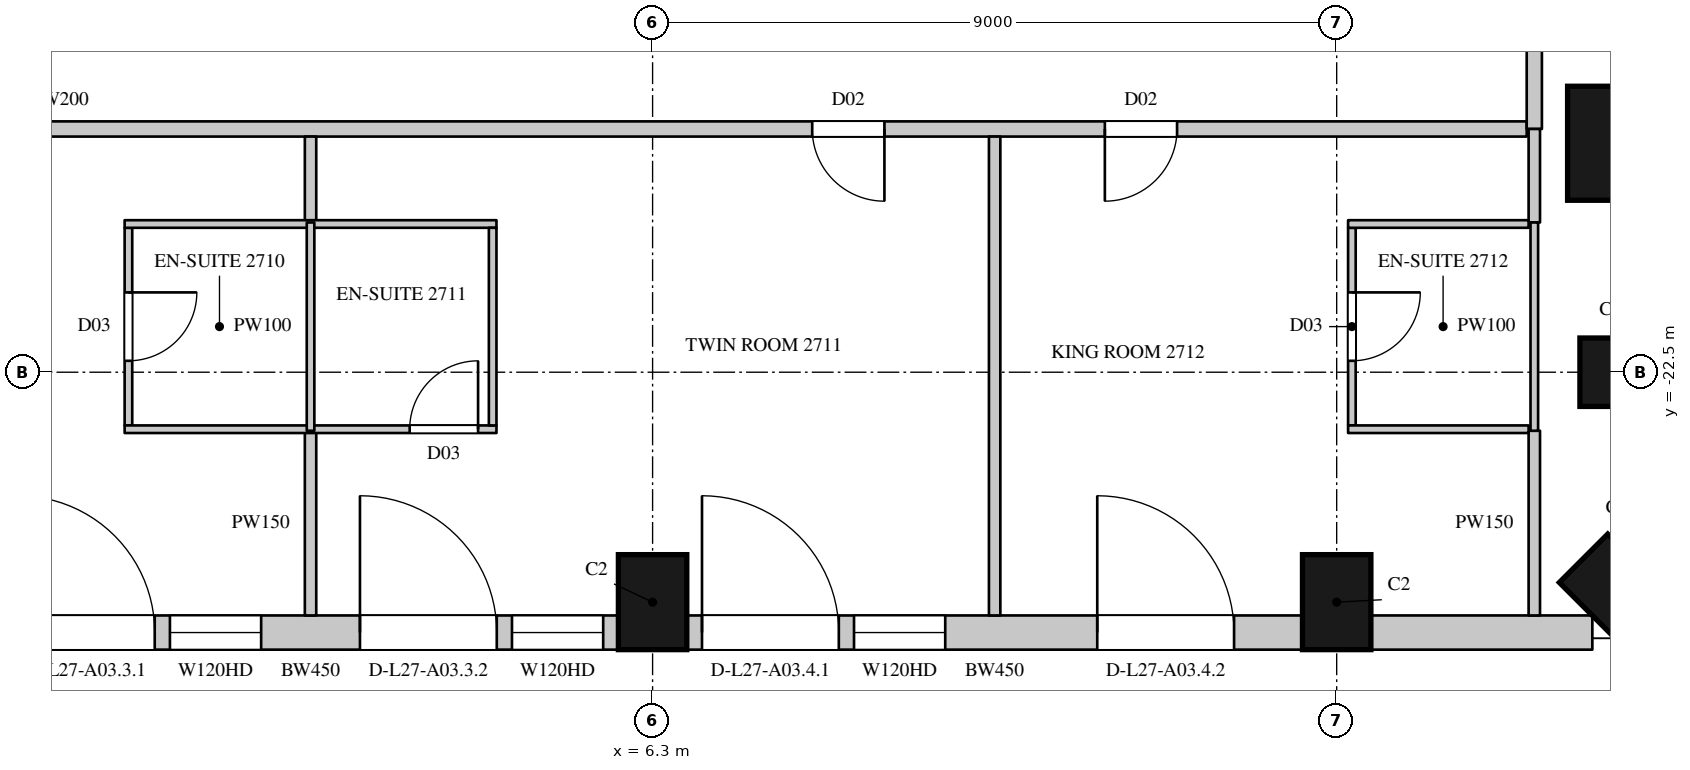
"""IFC4 building model, lengths in metres.
Left out: names, types, materials, properties, quantities, classifications, styles, units other than length and angle.
Written with IfcOpenShell. Run it as: python <this file> out.ifc"""

import sys

from ifc_helpers import new_model, si_unit, direction, frame, frame_2d, origin, origin_2d, place, context, subcontext, project, spatial, rectangle, circle, extrude, element, fill, save


model = new_model("IFC4")
c1 = context("Model", 3, precision=1e-05, world=origin(), true_north=direction((0.0, 1.0)))
c2 = subcontext(c1, "Body", "Model", "MODEL_VIEW")
j1 = project(units=[si_unit("LENGTHUNIT", "METRE"), si_unit("PLANEANGLEUNIT", "RADIAN")], contexts=[c1])
p1 = place(None, origin())
s1 = spatial("IfcSite", under=j1, at=p1, CompositionType="ELEMENT")
p2 = place(p1, origin())
s2 = spatial("IfcBuilding", under=s1, at=p2, CompositionType="ELEMENT")
p3 = place(p2, frame((0.0, 0.0, 127.5)))
s3 = spatial("IfcBuildingStorey", under=s2, at=p3, CompositionType="ELEMENT", Elevation=127.5)
for number, where, z_axis, x_axis in (
    (1, (6.3, -25.525, 0.0), (0.0, 0.0, 1.0), (1.0, 0.0, 0.0)),
    (2, (15.3, -25.525, 0.0), (0.0, 0.0, 1.0), (1.0, 0.0, 0.0)),
    (3, (18.99, -25.39, 0.0), (0.0, 0.0, 1.0), (0.707, 0.707, 0.0)),
    (4, (19.125, -22.5, 0.0), (0.0, 0.0, 1.0), (0.0, 1.0, 0.0)),
):
    element("IfcColumn", number, at=place(p3, frame(where, z_axis=z_axis, x_axis=x_axis)), inside=s3, PredefinedType="COLUMN", context=c2, shape_type="SweptSolid", body=[
        extrude(rectangle(XDim=0.9, YDim=1.25, at=origin_2d()), origin(), (0.0, 0.0, 1.0), 3.6),
    ])
p4 = place(p3, frame((19.088, -19.488, 0.0), z_axis=(0.0, 0.0, 1.0), x_axis=(1.0, 0.0, 0.0)))
e5 = element("IfcColumn", 5, at=p4, inside=s3, PredefinedType="COLUMN", context=c2, shape_type="SweptSolid", body=[
    extrude(circle(Radius=0.75, at=origin_2d()), origin(), (0.0, 0.0, 1.0), 3.6),
])
p5 = place(p3, frame((-2.25, -25.925, 0.0), z_axis=(0.0, 0.0, 1.0), x_axis=(1.0, 0.0, 0.0)))
e6 = element("IfcWall", 6, at=p5, inside=s3, PredefinedType="SOLIDWALL", context=c2, shape_type="SweptSolid", body=[
    extrude(rectangle(XDim=8.1, YDim=0.45, at=frame_2d((4.05, 0.0))), origin(), (0.0, 0.0, 1.0), 3.3),
])
p6 = place(p5, frame((0.2, 0.0, 0.0)))
e7 = element("IfcOpeningElement", 7, at=p6, cuts=e6, PredefinedType="OPENING", context=c2, shape_type="SweptSolid", body=[
    extrude(rectangle(XDim=1.8, YDim=2.4, at=frame_2d((0.9, 1.2))), frame((0.0, 0.235, 0.0), z_axis=(0.0, -1.0, 0.0), x_axis=(1.0, 0.0, 0.0)), (0.0, 0.0, 1.0), 0.47),
])
p7 = place(p5, frame((2.2, 0.0, 1.05)))
e8 = element("IfcOpeningElement", 8, at=p7, cuts=e6, PredefinedType="OPENING", context=c2, shape_type="SweptSolid", body=[
    extrude(rectangle(XDim=1.2, YDim=2.0, at=frame_2d((0.6, 1.0))), frame((0.0, 0.235, 0.0), z_axis=(0.0, -1.0, 0.0), x_axis=(1.0, 0.0, 0.0)), (0.0, 0.0, 1.0), 0.47),
])
p8 = place(p5, frame((4.7, 0.0, 0.0)))
e9 = element("IfcOpeningElement", 9, at=p8, cuts=e6, PredefinedType="OPENING", context=c2, shape_type="SweptSolid", body=[
    extrude(rectangle(XDim=1.8, YDim=2.4, at=frame_2d((0.9, 1.2))), frame((0.0, 0.235, 0.0), z_axis=(0.0, -1.0, 0.0), x_axis=(1.0, 0.0, 0.0)), (0.0, 0.0, 1.0), 0.47),
])
p9 = place(p5, frame((6.7, 0.0, 1.05)))
e10 = element("IfcOpeningElement", 10, at=p9, cuts=e6, PredefinedType="OPENING", context=c2, shape_type="SweptSolid", body=[
    extrude(rectangle(XDim=1.2, YDim=2.0, at=frame_2d((0.6, 1.0))), frame((0.0, 0.235, 0.0), z_axis=(0.0, -1.0, 0.0), x_axis=(1.0, 0.0, 0.0)), (0.0, 0.0, 1.0), 0.47),
])
p10 = place(p3, frame((6.75, -25.925, 0.0), z_axis=(0.0, 0.0, 1.0), x_axis=(1.0, 0.0, 0.0)))
e11 = element("IfcWall", 11, at=p10, inside=s3, PredefinedType="SOLIDWALL", context=c2, shape_type="SweptSolid", body=[
    extrude(rectangle(XDim=8.1, YDim=0.45, at=frame_2d((4.05, 0.0))), origin(), (0.0, 0.0, 1.0), 3.3),
])
p11 = place(p10, frame((0.2, 0.0, 0.0)))
e12 = element("IfcOpeningElement", 12, at=p11, cuts=e11, PredefinedType="OPENING", context=c2, shape_type="SweptSolid", body=[
    extrude(rectangle(XDim=1.8, YDim=2.4, at=frame_2d((0.9, 1.2))), frame((0.0, 0.235, 0.0), z_axis=(0.0, -1.0, 0.0), x_axis=(1.0, 0.0, 0.0)), (0.0, 0.0, 1.0), 0.47),
])
p12 = place(p10, frame((2.2, 0.0, 1.05)))
e13 = element("IfcOpeningElement", 13, at=p12, cuts=e11, PredefinedType="OPENING", context=c2, shape_type="SweptSolid", body=[
    extrude(rectangle(XDim=1.2, YDim=2.0, at=frame_2d((0.6, 1.0))), frame((0.0, 0.235, 0.0), z_axis=(0.0, -1.0, 0.0), x_axis=(1.0, 0.0, 0.0)), (0.0, 0.0, 1.0), 0.47),
])
p13 = place(p10, frame((5.4, 0.0, 0.0)))
e14 = element("IfcOpeningElement", 14, at=p13, cuts=e11, PredefinedType="OPENING", context=c2, shape_type="SweptSolid", body=[
    extrude(rectangle(XDim=1.8, YDim=2.4, at=frame_2d((0.9, 1.2))), frame((0.0, 0.235, 0.0), z_axis=(0.0, -1.0, 0.0), x_axis=(1.0, 0.0, 0.0)), (0.0, 0.0, 1.0), 0.47),
])
p14 = place(p3, frame((15.75, -25.925, 0.0), z_axis=(0.0, 0.0, 1.0), x_axis=(1.0, 0.0, 0.0)))
e15 = element("IfcWall", 15, at=p14, inside=s3, PredefinedType="SOLIDWALL", context=c2, shape_type="SweptSolid", body=[
    extrude(rectangle(XDim=2.914, YDim=0.45, at=frame_2d((1.457, 0.0))), origin(), (0.0, 0.0, 1.0), 3.3),
])
p15 = place(p3, frame((-20.8, -19.3, 0.0), z_axis=(0.0, 0.0, 1.0), x_axis=(1.0, 0.0, 0.0)))
e16 = element("IfcWall", 16, at=p15, inside=s3, PredefinedType="PARTITIONING", context=c2, shape_type="SweptSolid", body=[
    extrude(rectangle(XDim=38.6, YDim=0.2, at=frame_2d((19.3, 0.0))), origin(), (0.0, 0.0, 1.0), 3.3),
])
p16 = place(p15, frame((11.2, 0.0, 0.0)))
e17 = element("IfcOpeningElement", 17, at=p16, cuts=e16, PredefinedType="OPENING", context=c2, shape_type="SweptSolid", body=[
    extrude(rectangle(XDim=0.95, YDim=2.2, at=frame_2d((0.475, 1.1))), frame((0.0, 0.11, 0.0), z_axis=(0.0, -1.0, 0.0), x_axis=(1.0, 0.0, 0.0)), (0.0, 0.0, 1.0), 0.22),
])
p17 = place(p15, frame((15.05, 0.0, 0.0)))
e18 = element("IfcOpeningElement", 18, at=p17, cuts=e16, PredefinedType="OPENING", context=c2, shape_type="SweptSolid", body=[
    extrude(rectangle(XDim=0.95, YDim=2.2, at=frame_2d((0.475, 1.1))), frame((0.0, 0.11, 0.0), z_axis=(0.0, -1.0, 0.0), x_axis=(1.0, 0.0, 0.0)), (0.0, 0.0, 1.0), 0.22),
])
p18 = place(p15, frame((29.2, 0.0, 0.0)))
e19 = element("IfcOpeningElement", 19, at=p18, cuts=e16, PredefinedType="OPENING", context=c2, shape_type="SweptSolid", body=[
    extrude(rectangle(XDim=0.95, YDim=2.2, at=frame_2d((0.475, 1.1))), frame((0.0, 0.11, 0.0), z_axis=(0.0, -1.0, 0.0), x_axis=(1.0, 0.0, 0.0)), (0.0, 0.0, 1.0), 0.22),
])
p19 = place(p15, frame((33.05, 0.0, 0.0)))
e20 = element("IfcOpeningElement", 20, at=p19, cuts=e16, PredefinedType="OPENING", context=c2, shape_type="SweptSolid", body=[
    extrude(rectangle(XDim=0.95, YDim=2.2, at=frame_2d((0.475, 1.1))), frame((0.0, 0.11, 0.0), z_axis=(0.0, -1.0, 0.0), x_axis=(1.0, 0.0, 0.0)), (0.0, 0.0, 1.0), 0.22),
])
p20 = place(p3, frame((17.9, -19.3, 0.0), z_axis=(0.0, 0.0, 1.0), x_axis=(0.0, 1.0, 0.0)))
e21 = element("IfcWall", 21, at=p20, inside=s3, PredefinedType="PARTITIONING", context=c2, shape_type="SweptSolid", body=[
    extrude(rectangle(XDim=14.55, YDim=0.2, at=frame_2d((7.275, 0.0))), origin(), (0.0, 0.0, 1.0), 3.3),
])
p21 = place(p20, frame((3.7, 0.0, 0.0)))
e22 = element("IfcOpeningElement", 22, at=p21, cuts=e21, PredefinedType="OPENING", context=c2, shape_type="SweptSolid", body=[
    extrude(rectangle(XDim=0.95, YDim=2.2, at=frame_2d((0.475, 1.1))), frame((0.0, 0.11, 0.0), z_axis=(0.0, -1.0, 0.0), x_axis=(1.0, 0.0, 0.0)), (0.0, 0.0, 1.0), 0.22),
])
p22 = place(p20, frame((13.2, 0.0, 0.0)))
e23 = element("IfcOpeningElement", 23, at=p22, cuts=e21, PredefinedType="OPENING", context=c2, shape_type="SweptSolid", body=[
    extrude(rectangle(XDim=0.95, YDim=2.2, at=frame_2d((0.475, 1.1))), frame((0.0, 0.11, 0.0), z_axis=(0.0, -1.0, 0.0), x_axis=(1.0, 0.0, 0.0)), (0.0, 0.0, 1.0), 0.22),
])
p23 = place(p3, frame((1.8, -25.7, 0.0), z_axis=(0.0, 0.0, 1.0), x_axis=(0.0, 1.0, 0.0)))
e24 = element("IfcWall", 24, at=p23, inside=s3, PredefinedType="PARTITIONING", context=c2, shape_type="SweptSolid", body=[
    extrude(rectangle(XDim=2.43, YDim=0.15, at=frame_2d((1.215, 0.0))), origin(), (0.0, 0.0, 1.0), 2.65),
])
p24 = place(p3, frame((1.8, -20.53, 0.0), z_axis=(0.0, 0.0, 1.0), x_axis=(0.0, 1.0, 0.0)))
e25 = element("IfcWall", 25, at=p24, inside=s3, PredefinedType="PARTITIONING", context=c2, shape_type="SweptSolid", body=[
    extrude(rectangle(XDim=1.13, YDim=0.15, at=frame_2d((0.565, 0.0))), origin(), (0.0, 0.0, 1.0), 2.65),
])
p25 = place(p3, frame((10.8, -25.7, 0.0), z_axis=(0.0, 0.0, 1.0), x_axis=(0.0, 1.0, 0.0)))
e26 = element("IfcWall", 26, at=p25, inside=s3, PredefinedType="PARTITIONING", context=c2, shape_type="SweptSolid", body=[
    extrude(rectangle(XDim=6.3, YDim=0.15, at=frame_2d((3.15, 0.0))), origin(), (0.0, 0.0, 1.0), 2.65),
])
p26 = place(p3, frame((17.9, -25.7, 0.0), z_axis=(0.0, 0.0, 1.0), x_axis=(0.0, 1.0, 0.0)))
e27 = element("IfcWall", 27, at=p26, inside=s3, PredefinedType="PARTITIONING", context=c2, shape_type="SweptSolid", body=[
    extrude(rectangle(XDim=2.43, YDim=0.15, at=frame_2d((1.215, 0.0))), origin(), (0.0, 0.0, 1.0), 3.3),
])
p27 = place(p3, frame((17.9, -20.53, 0.0), z_axis=(0.0, 0.0, 1.0), x_axis=(0.0, 1.0, 0.0)))
e28 = element("IfcWall", 28, at=p27, inside=s3, PredefinedType="PARTITIONING", context=c2, shape_type="SweptSolid", body=[
    extrude(rectangle(XDim=1.23, YDim=0.15, at=frame_2d((0.615, 0.0))), origin(), (0.0, 0.0, 1.0), 3.3),
])
p28 = place(p3, frame((-0.596, -23.2, 0.0), z_axis=(0.0, 0.0, 1.0), x_axis=(0.0, 1.0, 0.0)))
e29 = element("IfcWall", 29, at=p28, inside=s3, PredefinedType="PARTITIONING", context=c2, shape_type="SweptSolid", body=[
    extrude(rectangle(XDim=2.6, YDim=0.1, at=frame_2d((1.3, 0.0))), origin(), (0.0, 0.0, 1.0), 3.3),
])
p29 = place(p28, frame((0.85, 0.0, 0.0)))
e30 = element("IfcOpeningElement", 30, at=p29, cuts=e29, PredefinedType="OPENING", context=c2, shape_type="SweptSolid", body=[
    extrude(rectangle(XDim=0.9, YDim=2.2, at=frame_2d((0.45, 1.1))), frame((0.0, 0.06, 0.0), z_axis=(0.0, -1.0, 0.0), x_axis=(1.0, 0.0, 0.0)), (0.0, 0.0, 1.0), 0.12),
])
p30 = place(p3, frame((-0.646, -23.25, 0.0), z_axis=(0.0, 0.0, 1.0), x_axis=(1.0, 0.0, 0.0)))
e31 = element("IfcWall", 31, at=p30, inside=s3, PredefinedType="PARTITIONING", context=c2, shape_type="SweptSolid", body=[
    extrude(rectangle(XDim=4.892, YDim=0.1, at=frame_2d((2.446, 0.0))), origin(), (0.0, 0.0, 1.0), 3.3),
])
p31 = place(p30, frame((3.75, 0.0, 0.0)))
e32 = element("IfcOpeningElement", 32, at=p31, cuts=e31, PredefinedType="OPENING", context=c2, shape_type="SweptSolid", body=[
    extrude(rectangle(XDim=0.9, YDim=2.2, at=frame_2d((0.45, 1.1))), frame((0.0, 0.06, 0.0), z_axis=(0.0, -1.0, 0.0), x_axis=(1.0, 0.0, 0.0)), (0.0, 0.0, 1.0), 0.12),
])
p32 = place(p3, frame((-0.646, -20.55, 0.0), z_axis=(0.0, 0.0, 1.0), x_axis=(1.0, 0.0, 0.0)))
e33 = element("IfcWall", 33, at=p32, inside=s3, PredefinedType="PARTITIONING", context=c2, shape_type="SweptSolid", body=[
    extrude(rectangle(XDim=4.892, YDim=0.1, at=frame_2d((2.446, 0.0))), origin(), (0.0, 0.0, 1.0), 3.3),
])
p33 = place(p3, frame((1.8, -23.27, 0.0), z_axis=(0.0, 0.0, 1.0), x_axis=(0.0, 1.0, 0.0)))
e34 = element("IfcWall", 34, at=p33, inside=s3, PredefinedType="PARTITIONING", context=c2, shape_type="SweptSolid", body=[
    extrude(rectangle(XDim=2.74, YDim=0.1, at=frame_2d((1.37, 0.0))), origin(), (0.0, 0.0, 1.0), 2.65),
])
p34 = place(p3, frame((4.196, -23.2, 0.0), z_axis=(0.0, 0.0, 1.0), x_axis=(0.0, 1.0, 0.0)))
e35 = element("IfcWall", 35, at=p34, inside=s3, PredefinedType="PARTITIONING", context=c2, shape_type="SweptSolid", body=[
    extrude(rectangle(XDim=2.6, YDim=0.1, at=frame_2d((1.3, 0.0))), origin(), (0.0, 0.0, 1.0), 3.3),
])
p35 = place(p3, frame((15.5, -23.2, 0.0), z_axis=(0.0, 0.0, 1.0), x_axis=(0.0, 1.0, 0.0)))
e36 = element("IfcWall", 36, at=p35, inside=s3, PredefinedType="PARTITIONING", context=c2, shape_type="SweptSolid", body=[
    extrude(rectangle(XDim=2.6, YDim=0.1, at=frame_2d((1.3, 0.0))), origin(), (0.0, 0.0, 1.0), 2.75),
])
p36 = place(p35, frame((0.85, 0.0, 0.0)))
e37 = element("IfcOpeningElement", 37, at=p36, cuts=e36, PredefinedType="OPENING", context=c2, shape_type="SweptSolid", body=[
    extrude(rectangle(XDim=0.9, YDim=2.2, at=frame_2d((0.45, 1.1))), frame((0.0, 0.06, 0.0), z_axis=(0.0, -1.0, 0.0), x_axis=(1.0, 0.0, 0.0)), (0.0, 0.0, 1.0), 0.12),
])
for number, where, z_axis, x_axis in (
    (38, (15.45, -23.25, 0.0), (0.0, 0.0, 1.0), (1.0, 0.0, 0.0)),
    (39, (15.45, -20.55, 0.0), (0.0, 0.0, 1.0), (1.0, 0.0, 0.0)),
):
    element("IfcWall", number, at=place(p3, frame(where, z_axis=z_axis, x_axis=x_axis)), inside=s3, PredefinedType="PARTITIONING", context=c2, shape_type="SweptSolid", body=[
        extrude(rectangle(XDim=2.375, YDim=0.1, at=frame_2d((1.188, 0.0))), origin(), (0.0, 0.0, 1.0), 3.3),
    ])
p37 = place(p3, frame((17.9, -23.27, 0.0), z_axis=(0.0, 0.0, 1.0), x_axis=(0.0, 1.0, 0.0)))
e40 = element("IfcWall", 40, at=p37, inside=s3, PredefinedType="PARTITIONING", context=c2, shape_type="SweptSolid", body=[
    extrude(rectangle(XDim=2.74, YDim=0.1, at=frame_2d((1.37, 0.0))), origin(), (0.0, 0.0, 1.0), 3.3),
])
p38 = place(p6, origin())
e41 = element("IfcDoor", 41, at=p38, inside=s3, OperationType="SLIDING_TO_LEFT", PredefinedType="DOOR", context=c2, shape_type="SweptSolid", body=[
    extrude(rectangle(XDim=1.8, YDim=2.4, at=frame_2d((0.9, 1.2))), frame((0.0, 0.13, 0.0), z_axis=(0.0, -1.0, 0.0), x_axis=(1.0, 0.0, 0.0)), (0.0, 0.0, 1.0), 0.05),
])
fill(e7, e41)
p39 = place(p7, origin())
e42 = element("IfcWindow", 42, at=p39, inside=s3, PartitioningType="SINGLE_PANEL", PredefinedType="WINDOW", context=c2, shape_type="SweptSolid", body=[
    extrude(rectangle(XDim=1.2, YDim=2.0, at=frame_2d((0.6, 1.0))), frame((0.0, 0.135, 0.0), z_axis=(0.0, -1.0, 0.0), x_axis=(1.0, 0.0, 0.0)), (0.0, 0.0, 1.0), 0.06),
])
fill(e8, e42)
p40 = place(p8, origin())
e43 = element("IfcDoor", 43, at=p40, inside=s3, OperationType="SLIDING_TO_LEFT", PredefinedType="DOOR", context=c2, shape_type="SweptSolid", body=[
    extrude(rectangle(XDim=1.8, YDim=2.4, at=frame_2d((0.9, 1.2))), frame((0.0, 0.13, 0.0), z_axis=(0.0, -1.0, 0.0), x_axis=(1.0, 0.0, 0.0)), (0.0, 0.0, 1.0), 0.05),
])
fill(e9, e43)
p41 = place(p9, origin())
e44 = element("IfcWindow", 44, at=p41, inside=s3, PartitioningType="SINGLE_PANEL", PredefinedType="WINDOW", context=c2, shape_type="SweptSolid", body=[
    extrude(rectangle(XDim=1.2, YDim=2.0, at=frame_2d((0.6, 1.0))), frame((0.0, 0.135, 0.0), z_axis=(0.0, -1.0, 0.0), x_axis=(1.0, 0.0, 0.0)), (0.0, 0.0, 1.0), 0.06),
])
fill(e10, e44)
p42 = place(p11, origin())
e45 = element("IfcDoor", 45, at=p42, inside=s3, OperationType="SLIDING_TO_LEFT", PredefinedType="DOOR", context=c2, shape_type="SweptSolid", body=[
    extrude(rectangle(XDim=1.8, YDim=2.4, at=frame_2d((0.9, 1.2))), frame((0.0, 0.13, 0.0), z_axis=(0.0, -1.0, 0.0), x_axis=(1.0, 0.0, 0.0)), (0.0, 0.0, 1.0), 0.05),
])
fill(e12, e45)
p43 = place(p12, origin())
e46 = element("IfcWindow", 46, at=p43, inside=s3, PartitioningType="SINGLE_PANEL", PredefinedType="WINDOW", context=c2, shape_type="SweptSolid", body=[
    extrude(rectangle(XDim=1.2, YDim=2.0, at=frame_2d((0.6, 1.0))), frame((0.0, 0.135, 0.0), z_axis=(0.0, -1.0, 0.0), x_axis=(1.0, 0.0, 0.0)), (0.0, 0.0, 1.0), 0.06),
])
fill(e13, e46)
p44 = place(p13, origin())
e47 = element("IfcDoor", 47, at=p44, inside=s3, OperationType="SLIDING_TO_LEFT", PredefinedType="DOOR", context=c2, shape_type="SweptSolid", body=[
    extrude(rectangle(XDim=1.8, YDim=2.4, at=frame_2d((0.9, 1.2))), frame((0.0, 0.13, 0.0), z_axis=(0.0, -1.0, 0.0), x_axis=(1.0, 0.0, 0.0)), (0.0, 0.0, 1.0), 0.05),
])
fill(e14, e47)
p45 = place(p29, origin())
e48 = element("IfcDoor", 48, at=p45, inside=s3, OperationType="SINGLE_SWING_LEFT", PredefinedType="DOOR", context=c2, shape_type="SweptSolid", body=[
    extrude(rectangle(XDim=0.9, YDim=2.2, at=frame_2d((0.45, 1.1))), frame((0.0, 0.025, 0.0), z_axis=(0.0, -1.0, 0.0), x_axis=(1.0, 0.0, 0.0)), (0.0, 0.0, 1.0), 0.05),
])
fill(e30, e48)
p46 = place(p18, origin())
e49 = element("IfcDoor", 49, at=p46, inside=s3, OperationType="SINGLE_SWING_LEFT", PredefinedType="DOOR", context=c2, shape_type="SweptSolid", body=[
    extrude(rectangle(XDim=0.95, YDim=2.2, at=frame_2d((0.475, 1.1))), frame((0.0, 0.025, 0.0), z_axis=(0.0, -1.0, 0.0), x_axis=(1.0, 0.0, 0.0)), (0.0, 0.0, 1.0), 0.05),
])
fill(e19, e49)
p47 = place(p31, origin())
e50 = element("IfcDoor", 50, at=p47, inside=s3, OperationType="SINGLE_SWING_RIGHT", PredefinedType="DOOR", context=c2, shape_type="SweptSolid", body=[
    extrude(rectangle(XDim=0.9, YDim=2.2, at=frame_2d((0.45, 1.1))), frame((0.0, 0.025, 0.0), z_axis=(0.0, -1.0, 0.0), x_axis=(1.0, 0.0, 0.0)), (0.0, 0.0, 1.0), 0.05),
])
fill(e32, e50)
p48 = place(p19, origin())
e51 = element("IfcDoor", 51, at=p48, inside=s3, OperationType="SINGLE_SWING_RIGHT", PredefinedType="DOOR", context=c2, shape_type="SweptSolid", body=[
    extrude(rectangle(XDim=0.95, YDim=2.2, at=frame_2d((0.475, 1.1))), frame((0.0, 0.025, 0.0), z_axis=(0.0, -1.0, 0.0), x_axis=(1.0, 0.0, 0.0)), (0.0, 0.0, 1.0), 0.05),
])
fill(e20, e51)
p49 = place(p36, origin())
e52 = element("IfcDoor", 52, at=p49, inside=s3, OperationType="SINGLE_SWING_LEFT", PredefinedType="DOOR", context=c2, shape_type="SweptSolid", body=[
    extrude(rectangle(XDim=0.9, YDim=2.2, at=frame_2d((0.45, 1.1))), frame((0.0, 0.025, 0.0), z_axis=(0.0, -1.0, 0.0), x_axis=(1.0, 0.0, 0.0)), (0.0, 0.0, 1.0), 0.05),
])
fill(e37, e52)
save(model, sys.argv[1])
